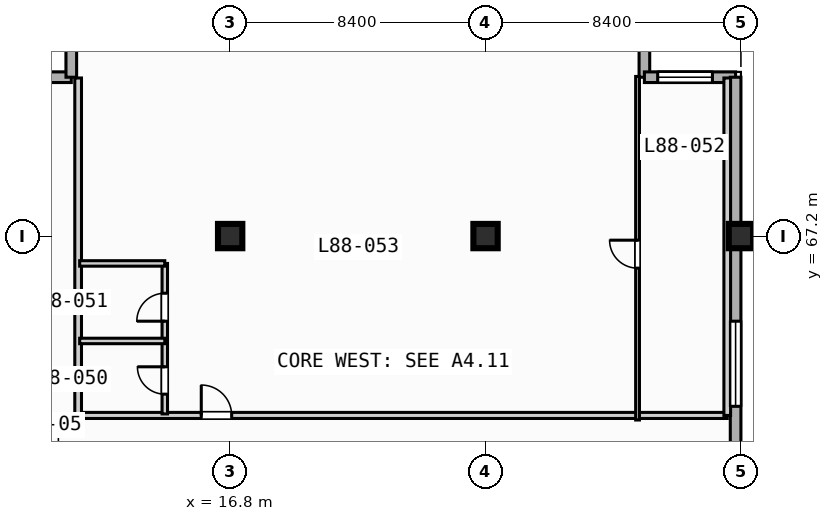
"""IFC4 building model, lengths in metres.
Left out: names, types, materials, properties, quantities, classifications, styles, units other than length and angle.
Written with IfcOpenShell. Run it as: python <this file> out.ifc"""

import sys

from ifc_helpers import new_model, si_unit, direction, frame, frame_2d, origin, origin_2d, place, context, subcontext, project, spatial, rectangle, extrude, element, fill, save


model = new_model("IFC4")
c1 = context("Model", 3, precision=1e-05, world=origin(), true_north=direction((0.0, 1.0)))
c2 = subcontext(c1, "Body", "Model", "MODEL_VIEW")
j1 = project(units=[si_unit("LENGTHUNIT", "METRE"), si_unit("PLANEANGLEUNIT", "RADIAN")], contexts=[c1])
p1 = place(None, origin())
s1 = spatial("IfcSite", under=j1, at=p1, CompositionType="ELEMENT")
p2 = place(p1, origin())
s2 = spatial("IfcBuilding", under=s1, at=p2, CompositionType="ELEMENT")
p3 = place(p2, frame((0.0, 0.0, 355.4)))
s3 = spatial("IfcBuildingStorey", under=s2, at=p3, CompositionType="ELEMENT", Elevation=355.4)
for number, where, z_axis, x_axis in (
    (1, (16.8, 67.2, 0.0), (0.0, 0.0, 1.0), (1.0, 0.0, 0.0)),
    (2, (25.2, 67.2, 0.0), (0.0, 0.0, 1.0), (1.0, 0.0, 0.0)),
    (3, (33.6, 67.2, 0.0), (0.0, 0.0, 1.0), (1.0, 0.0, 0.0)),
):
    element("IfcColumn", number, at=place(p3, frame(where, z_axis=z_axis, x_axis=x_axis)), inside=s3, PredefinedType="COLUMN", context=c2, shape_type="SweptSolid", body=[
        extrude(rectangle(XDim=0.8, YDim=0.8, at=origin_2d()), origin(), (0.0, 0.0, 1.0), 4.2),
    ])
for number, where, z_axis, x_axis in (
    (4, (8.575, 72.425, 0.0), (0.0, 0.0, 1.0), (1.0, 0.0, 0.0)),
    (5, (11.575, 72.425, 0.0), (0.0, 0.0, 1.0), (0.0, 1.0, 0.0)),
    (6, (30.425, 75.425, 0.0), (0.0, 0.0, 1.0), (0.0, -1.0, 0.0)),
):
    element("IfcWall", number, at=place(p3, frame(where, z_axis=z_axis, x_axis=x_axis)), inside=s3, PredefinedType="STANDARD", context=c2, shape_type="SweptSolid", body=[
        extrude(rectangle(XDim=3.0, YDim=0.35, at=frame_2d((1.5, 0.0))), origin(), (0.0, 0.0, 1.0), 3.97),
    ])
p4 = place(p3, frame((30.425, 72.425, 0.0), z_axis=(0.0, 0.0, 1.0), x_axis=(1.0, 0.0, 0.0)))
e7 = element("IfcWall", 7, at=p4, inside=s3, PredefinedType="STANDARD", context=c2, shape_type="SweptSolid", body=[
    extrude(rectangle(XDim=3.0, YDim=0.35, at=frame_2d((1.5, 0.0))), origin(), (0.0, 0.0, 1.0), 3.97),
])
p5 = place(p4, frame((0.438, 0.0, 0.85)))
e8 = element("IfcOpeningElement", 8, at=p5, cuts=e7, PredefinedType="OPENING", context=c2, shape_type="SweptSolid", body=[
    extrude(rectangle(XDim=1.8, YDim=1.8, at=frame_2d((0.9, 0.9))), frame((0.0, 0.185, 0.0), z_axis=(0.0, -1.0, 0.0), x_axis=(1.0, 0.0, 0.0)), (0.0, 0.0, 1.0), 0.37),
])
p6 = place(p3, frame((33.425, 72.425, 0.0), z_axis=(0.0, 0.0, 1.0), x_axis=(0.0, -1.0, 0.0)))
e9 = element("IfcWall", 9, at=p6, inside=s3, PredefinedType="STANDARD", context=c2, shape_type="SweptSolid", body=[
    extrude(rectangle(XDim=39.0, YDim=0.35, at=frame_2d((19.5, 0.0))), origin(), (0.0, 0.0, 1.0), 3.97),
])
p7 = place(p6, frame((33.225, 0.0, 0.85)))
e10 = element("IfcOpeningElement", 10, at=p7, cuts=e9, PredefinedType="OPENING", context=c2, shape_type="SweptSolid", body=[
    extrude(rectangle(XDim=2.8, YDim=2.1, at=frame_2d((1.4, 1.05))), frame((0.0, 0.185, 0.0), z_axis=(0.0, -1.0, 0.0), x_axis=(1.0, 0.0, 0.0)), (0.0, 0.0, 1.0), 0.37),
])
p8 = place(p6, frame((8.025, 0.0, 0.85)))
e11 = element("IfcOpeningElement", 11, at=p8, cuts=e9, PredefinedType="OPENING", context=c2, shape_type="SweptSolid", body=[
    extrude(rectangle(XDim=2.8, YDim=2.1, at=frame_2d((1.4, 1.05))), frame((0.0, 0.185, 0.0), z_axis=(0.0, -1.0, 0.0), x_axis=(1.0, 0.0, 0.0)), (0.0, 0.0, 1.0), 0.37),
])
p9 = place(p3, frame((11.8, 61.3, 0.0), z_axis=(0.0, 0.0, 1.0), x_axis=(1.0, 0.0, 0.0)))
e12 = element("IfcWall", 12, at=p9, inside=s3, PredefinedType="PARTITIONING", context=c2, shape_type="SweptSolid", body=[
    extrude(rectangle(XDim=21.35, YDim=0.2, at=frame_2d((10.675, 0.0))), origin(), (0.0, 0.0, 1.0), 3.97),
])
p10 = place(p9, frame((4.05, 0.0, 0.0)))
e13 = element("IfcOpeningElement", 13, at=p10, cuts=e12, PredefinedType="OPENING", context=c2, shape_type="SweptSolid", body=[
    extrude(rectangle(XDim=1.0, YDim=2.15, at=frame_2d((0.5, 1.075))), frame((0.0, 0.11, 0.0), z_axis=(0.0, -1.0, 0.0), x_axis=(1.0, 0.0, 0.0)), (0.0, 0.0, 1.0), 0.22),
])
for number, where, z_axis, x_axis in (
    (14, (33.15, 61.3, 0.0), (0.0, 0.0, 1.0), (0.0, 1.0, 0.0)),
    (15, (11.8, 61.3, 0.0), (0.0, 0.0, 1.0), (0.0, 1.0, 0.0)),
):
    element("IfcWall", number, at=place(p3, frame(where, z_axis=z_axis, x_axis=x_axis)), inside=s3, PredefinedType="PARTITIONING", context=c2, shape_type="SweptSolid", body=[
        extrude(rectangle(XDim=11.1, YDim=0.22, at=frame_2d((5.55, 0.0))), origin(), (0.0, 0.0, 1.0), 3.97),
    ])
p11 = place(p3, frame((14.65, 61.35, 0.0), z_axis=(0.0, 0.0, 1.0), x_axis=(0.0, 1.0, 0.0)))
e16 = element("IfcWall", 16, at=p11, inside=s3, PredefinedType="PLUMBINGWALL", context=c2, shape_type="SweptSolid", body=[
    extrude(rectangle(XDim=4.95, YDim=0.18, at=frame_2d((2.475, 0.0))), origin(), (0.0, 0.0, 1.0), 3.97),
])
p12 = place(p11, frame((0.65, 0.0, 0.0)))
e17 = element("IfcOpeningElement", 17, at=p12, cuts=e16, PredefinedType="OPENING", context=c2, shape_type="SweptSolid", body=[
    extrude(rectangle(XDim=0.9, YDim=2.1, at=frame_2d((0.45, 1.05))), frame((0.0, 0.1, 0.0), z_axis=(0.0, -1.0, 0.0), x_axis=(1.0, 0.0, 0.0)), (0.0, 0.0, 1.0), 0.2),
])
p13 = place(p11, frame((3.05, 0.0, 0.0)))
e18 = element("IfcOpeningElement", 18, at=p13, cuts=e16, PredefinedType="OPENING", context=c2, shape_type="SweptSolid", body=[
    extrude(rectangle(XDim=0.92, YDim=2.1, at=frame_2d((0.46, 1.05))), frame((0.0, 0.1, 0.0), z_axis=(0.0, -1.0, 0.0), x_axis=(1.0, 0.0, 0.0)), (0.0, 0.0, 1.0), 0.2),
])
for number, where, z_axis, x_axis in (
    (19, (11.85, 63.75, 0.0), (0.0, 0.0, 1.0), (1.0, 0.0, 0.0)),
    (20, (11.85, 66.3, 0.0), (0.0, 0.0, 1.0), (1.0, 0.0, 0.0)),
):
    element("IfcWall", number, at=place(p3, frame(where, z_axis=z_axis, x_axis=x_axis)), inside=s3, PredefinedType="PLUMBINGWALL", context=c2, shape_type="SweptSolid", body=[
        extrude(rectangle(XDim=2.8, YDim=0.18, at=frame_2d((1.4, 0.0))), origin(), (0.0, 0.0, 1.0), 3.97),
    ])
p14 = place(p3, frame((30.2, 61.15, 0.0), z_axis=(0.0, 0.0, 1.0), x_axis=(0.0, 1.0, 0.0)))
e21 = element("IfcWall", 21, at=p14, inside=s3, PredefinedType="PARTITIONING", context=c2, shape_type="SweptSolid", body=[
    extrude(rectangle(XDim=11.3, YDim=0.125, at=frame_2d((5.65, 0.0))), origin(), (0.0, 0.0, 1.0), 3.97),
])
p15 = place(p14, frame((4.995, 0.0, 0.0)))
e22 = element("IfcOpeningElement", 22, at=p15, cuts=e21, PredefinedType="OPENING", context=c2, shape_type="SweptSolid", body=[
    extrude(rectangle(XDim=0.92, YDim=2.1, at=frame_2d((0.46, 1.05))), frame((0.0, 0.073, 0.0), z_axis=(0.0, -1.0, 0.0), x_axis=(1.0, 0.0, 0.0)), (0.0, 0.0, 1.0), 0.145),
])
p16 = place(p5, origin())
e23 = element("IfcWindow", 23, at=p16, inside=s3, PartitioningType="SINGLE_PANEL", PredefinedType="WINDOW", context=c2, shape_type="SweptSolid", body=[
    extrude(rectangle(XDim=1.8, YDim=1.8, at=frame_2d((0.9, 0.9))), frame((0.0, 0.03, 0.0), z_axis=(0.0, -1.0, 0.0), x_axis=(1.0, 0.0, 0.0)), (0.0, 0.0, 1.0), 0.06),
])
fill(e8, e23)
p17 = place(p8, origin())
e24 = element("IfcWindow", 24, at=p17, inside=s3, PartitioningType="SINGLE_PANEL", PredefinedType="WINDOW", context=c2, shape_type="SweptSolid", body=[
    extrude(rectangle(XDim=2.8, YDim=2.1, at=frame_2d((1.4, 1.05))), frame((0.0, 0.03, 0.0), z_axis=(0.0, -1.0, 0.0), x_axis=(1.0, 0.0, 0.0)), (0.0, 0.0, 1.0), 0.06),
])
fill(e11, e24)
p18 = place(p10, origin())
e25 = element("IfcDoor", 25, at=p18, inside=s3, OperationType="SINGLE_SWING_LEFT", PredefinedType="DOOR", context=c2, shape_type="SweptSolid", body=[
    extrude(rectangle(XDim=1.0, YDim=2.15, at=frame_2d((0.5, 1.075))), frame((0.0, 0.025, 0.0), z_axis=(0.0, -1.0, 0.0), x_axis=(1.0, 0.0, 0.0)), (0.0, 0.0, 1.0), 0.05),
])
fill(e13, e25)
p19 = place(p12, origin())
e26 = element("IfcDoor", 26, at=p19, inside=s3, OperationType="SINGLE_SWING_RIGHT", PredefinedType="DOOR", context=c2, shape_type="SweptSolid", body=[
    extrude(rectangle(XDim=0.9, YDim=2.1, at=frame_2d((0.45, 1.05))), frame((0.0, 0.025, 0.0), z_axis=(0.0, -1.0, 0.0), x_axis=(1.0, 0.0, 0.0)), (0.0, 0.0, 1.0), 0.05),
])
fill(e17, e26)
p20 = place(p13, origin())
e27 = element("IfcDoor", 27, at=p20, inside=s3, OperationType="SINGLE_SWING_LEFT", PredefinedType="DOOR", context=c2, shape_type="SweptSolid", body=[
    extrude(rectangle(XDim=0.92, YDim=2.1, at=frame_2d((0.46, 1.05))), frame((0.0, 0.025, 0.0), z_axis=(0.0, -1.0, 0.0), x_axis=(1.0, 0.0, 0.0)), (0.0, 0.0, 1.0), 0.05),
])
fill(e18, e27)
p21 = place(p15, origin())
e28 = element("IfcDoor", 28, at=p21, inside=s3, OperationType="SINGLE_SWING_RIGHT", PredefinedType="DOOR", context=c2, shape_type="SweptSolid", body=[
    extrude(rectangle(XDim=0.92, YDim=2.1, at=frame_2d((0.46, 1.05))), frame((0.0, 0.025, 0.0), z_axis=(0.0, -1.0, 0.0), x_axis=(1.0, 0.0, 0.0)), (0.0, 0.0, 1.0), 0.05),
])
fill(e22, e28)
save(model, sys.argv[1])
